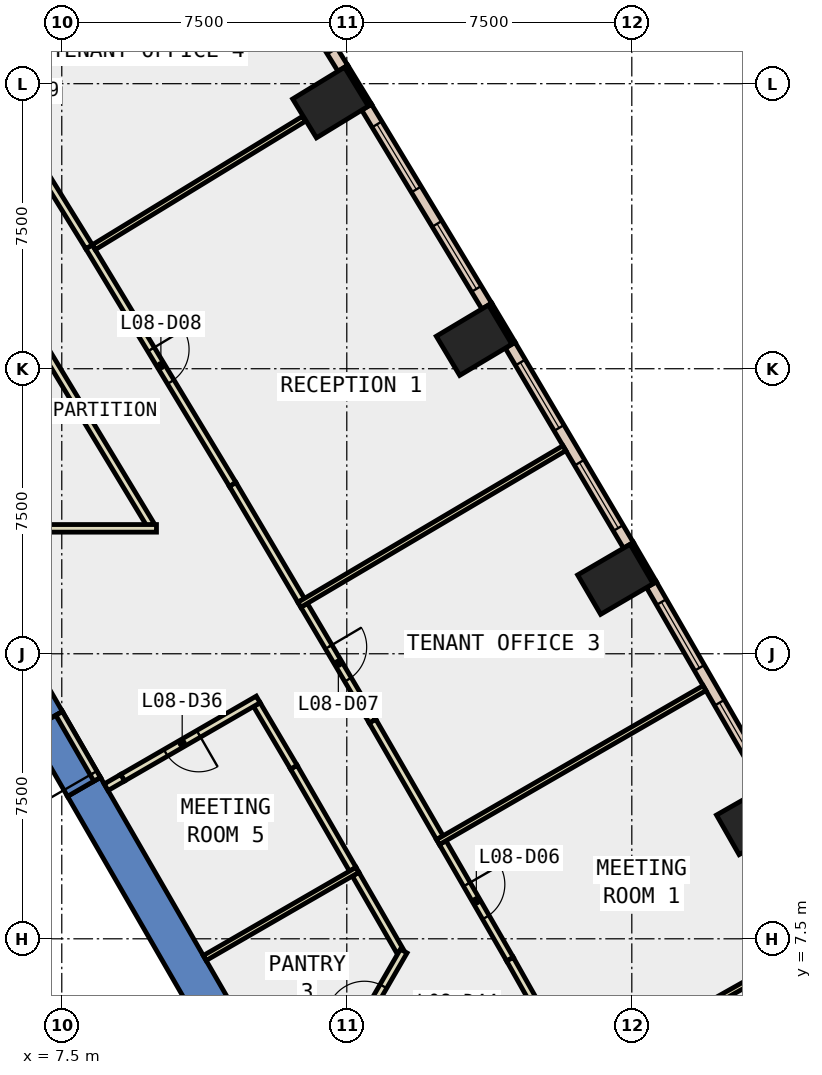
"""IFC4 building model, lengths in metres.
Left out: names, types, materials, properties, quantities, classifications, styles, units other than length and angle.
Written with IfcOpenShell. Run it as: python <this file> out.ifc"""

import sys

from ifc_helpers import new_model, si_unit, direction, frame, frame_2d, origin, origin_2d, place, context, subcontext, project, spatial, polyline, rectangle, outline, extrude, element, fill, save


model = new_model("IFC4")
c1 = context("Model", 3, precision=1e-05, world=origin(), true_north=direction((0.0, 1.0)))
c2 = subcontext(c1, "Body", "Model", "MODEL_VIEW")
j1 = project(units=[si_unit("LENGTHUNIT", "METRE"), si_unit("PLANEANGLEUNIT", "RADIAN")], contexts=[c1])
p1 = place(None, origin())
s1 = spatial("IfcSite", under=j1, at=p1, CompositionType="ELEMENT")
p2 = place(p1, origin())
s2 = spatial("IfcBuilding", under=s1, at=p2, CompositionType="ELEMENT")
p3 = place(p2, frame((0.0, 0.0, 43.4)))
s3 = spatial("IfcBuildingStorey", under=s2, at=p3, CompositionType="ELEMENT", Elevation=43.4)
for number, where, z_axis, x_axis in (
    (1, (25.721, 10.632, -0.4), (0.0, 0.0, 1.0), (-0.496, 0.869, 0.0)),
    (2, (22.068, 16.959, -0.4), (0.0, 0.0, 1.0), (-0.504, 0.864, 0.0)),
    (3, (18.35, 23.25, -0.4), (0.0, 0.0, 1.0), (-0.513, 0.858, 0.0)),
    (4, (14.571, 29.504, -0.4), (0.0, 0.0, 1.0), (-0.522, 0.853, 0.0)),
):
    element("IfcColumn", number, at=place(p3, frame(where, z_axis=z_axis, x_axis=x_axis)), inside=s3, PredefinedType="COLUMN", context=c2, shape_type="SweptSolid", body=[
        extrude(rectangle(XDim=1.2, YDim=1.6, at=origin_2d()), origin(), (0.0, 0.0, 1.0), 4.2),
    ])
p4 = place(p3, frame((0.0, 0.0, -0.4)))
e5 = element("IfcWall", 5, at=p4, inside=s3, PredefinedType="SHEAR", context=c2, shape_type="SweptSolid", body=[
    extrude(outline(polyline([(8.517, 11.748), (7.651, 11.248), (12.702, 2.5), (13.856, 2.5), (8.517, 11.748)])), origin(), (0.0, 0.0, 1.0), 4.2),
])
p5 = place(p3, frame((0.0, 0.0, -0.4)))
e6 = element("IfcWall", 6, at=p5, inside=s3, PredefinedType="SHEAR", context=c2, shape_type="SweptSolid", body=[
    extrude(outline(polyline([(6.651, 12.98), (7.517, 13.48), (6.928, 14.5), (6.351, 13.5), (6.651, 12.98)])), origin(), (0.0, 0.0, 1.0), 4.2),
])
p6 = place(p3, frame((0.0, 0.0, 3.6)))
e7 = element("IfcWall", 7, at=p6, inside=s3, PredefinedType="SHEAR", context=c2, shape_type="SweptSolid", body=[
    extrude(outline(polyline([(7.517, 13.48), (6.651, 12.98), (7.651, 11.248), (8.517, 11.748), (7.517, 13.48)])), origin(), (0.0, 0.0, 1.0), 0.2),
])
p7 = place(p3, frame((23.104, 16.87, 0.0), z_axis=(0.0, 0.0, 1.0), x_axis=(-0.504313844903, 0.863520437418, 0.0)))
e8 = element("IfcWall", 8, at=p7, inside=s3, PredefinedType="STANDARD", context=c2, shape_type="SweptSolid", body=[
    extrude(rectangle(XDim=1.2, YDim=0.1, at=frame_2d((0.6, 0.0))), origin(), (0.0, 0.0, 1.0), 3.8),
])
for number, where, z_axis, x_axis in (
    (9, (19.388, 23.171, 0.0), (0.0, 0.0, 1.0), (-0.513, 0.858, 0.0)),
    (10, (15.609, 29.435, 0.0), (0.0, 0.0, 1.0), (-0.522, 0.853, 0.0)),
):
    element("IfcWall", number, at=place(p3, frame(where, z_axis=z_axis, x_axis=x_axis)), inside=s3, PredefinedType="STANDARD", context=c2, shape_type="SweptSolid", body=[
        extrude(rectangle(XDim=1.2, YDim=0.1, at=frame_2d((0.6, 0.0))), origin(), (0.0, 0.0, 1.0), 3.8),
    ])
p8 = place(p3, frame((26.073, 11.522, 0.0), z_axis=(0.0, 0.0, 1.0), x_axis=(-0.499976985038, 0.866038691071, 0.0)))
e11 = element("IfcWall", 11, at=p8, inside=s3, PredefinedType="STANDARD", context=c2, shape_type="SweptSolid", body=[
    extrude(rectangle(XDim=6.116, YDim=0.3, at=frame_2d((3.058, 0.0))), origin(), (0.0, 0.0, 1.0), 3.8),
])
p9 = place(p8, frame((0.529, 0.0, 0.9)))
e12 = element("IfcOpeningElement", 12, at=p9, cuts=e11, PredefinedType="OPENING", context=c2, shape_type="SweptSolid", body=[
    extrude(rectangle(XDim=2.0, YDim=2.6, at=frame_2d((1.0, 1.3))), frame((0.0, 0.16, 0.0), z_axis=(0.0, -1.0, 0.0), x_axis=(1.0, 0.0, 0.0)), (0.0, 0.0, 1.0), 0.32),
])
p10 = place(p8, frame((3.587, 0.0, 0.9)))
e13 = element("IfcOpeningElement", 13, at=p10, cuts=e11, PredefinedType="OPENING", context=c2, shape_type="SweptSolid", body=[
    extrude(rectangle(XDim=2.0, YDim=2.6, at=frame_2d((1.0, 1.3))), frame((0.0, 0.16, 0.0), z_axis=(0.0, -1.0, 0.0), x_axis=(1.0, 0.0, 0.0)), (0.0, 0.0, 1.0), 0.32),
])
p11 = place(p3, frame((22.411, 17.853, 0.0), z_axis=(0.0, 0.0, 1.0), x_axis=(-0.508749483145, 0.860914608658, 0.0)))
e14 = element("IfcWall", 14, at=p11, inside=s3, PredefinedType="STANDARD", context=c2, shape_type="SweptSolid", body=[
    extrude(rectangle(XDim=6.117, YDim=0.3, at=frame_2d((3.058, 0.0))), origin(), (0.0, 0.0, 1.0), 3.8),
])
p12 = place(p11, frame((0.529, 0.0, 0.9)))
e15 = element("IfcOpeningElement", 15, at=p12, cuts=e14, PredefinedType="OPENING", context=c2, shape_type="SweptSolid", body=[
    extrude(rectangle(XDim=2.0, YDim=2.6, at=frame_2d((1.0, 1.3))), frame((0.0, 0.16, 0.0), z_axis=(0.0, -1.0, 0.0), x_axis=(1.0, 0.0, 0.0)), (0.0, 0.0, 1.0), 0.32),
])
p13 = place(p11, frame((3.588, 0.0, 0.9)))
e16 = element("IfcOpeningElement", 16, at=p13, cuts=e14, PredefinedType="OPENING", context=c2, shape_type="SweptSolid", body=[
    extrude(rectangle(XDim=2.0, YDim=2.6, at=frame_2d((1.0, 1.3))), frame((0.0, 0.16, 0.0), z_axis=(0.0, -1.0, 0.0), x_axis=(1.0, 0.0, 0.0)), (0.0, 0.0, 1.0), 0.32),
])
p14 = place(p3, frame((18.684, 24.148, 0.0), z_axis=(0.0, 0.0, 1.0), x_axis=(-0.517211293816, 0.855857743757, 0.0)))
e17 = element("IfcWall", 17, at=p14, inside=s3, PredefinedType="STANDARD", context=c2, shape_type="SweptSolid", body=[
    extrude(rectangle(XDim=6.116, YDim=0.3, at=frame_2d((3.058, 0.0))), origin(), (0.0, 0.0, 1.0), 3.8),
])
p15 = place(p14, frame((0.529, 0.0, 0.9)))
e18 = element("IfcOpeningElement", 18, at=p15, cuts=e17, PredefinedType="OPENING", context=c2, shape_type="SweptSolid", body=[
    extrude(rectangle(XDim=2.0, YDim=2.6, at=frame_2d((1.0, 1.3))), frame((0.0, 0.16, 0.0), z_axis=(0.0, -1.0, 0.0), x_axis=(1.0, 0.0, 0.0)), (0.0, 0.0, 1.0), 0.32),
])
p16 = place(p14, frame((3.587, 0.0, 0.9)))
e19 = element("IfcOpeningElement", 19, at=p16, cuts=e17, PredefinedType="OPENING", context=c2, shape_type="SweptSolid", body=[
    extrude(rectangle(XDim=2.0, YDim=2.6, at=frame_2d((1.0, 1.3))), frame((0.0, 0.16, 0.0), z_axis=(0.0, -1.0, 0.0), x_axis=(1.0, 0.0, 0.0)), (0.0, 0.0, 1.0), 0.32),
])
p17 = place(p3, frame((14.896, 30.404, 0.0), z_axis=(0.0, 0.0, 1.0), x_axis=(-0.525791118496, 0.850613719447, 0.0)))
e20 = element("IfcWall", 20, at=p17, inside=s3, PredefinedType="STANDARD", context=c2, shape_type="SweptSolid", body=[
    extrude(rectangle(XDim=6.117, YDim=0.3, at=frame_2d((3.058, 0.0))), origin(), (0.0, 0.0, 1.0), 3.8),
])
p18 = place(p17, frame((0.529, 0.0, 0.9)))
e21 = element("IfcOpeningElement", 21, at=p18, cuts=e20, PredefinedType="OPENING", context=c2, shape_type="SweptSolid", body=[
    extrude(rectangle(XDim=2.0, YDim=2.6, at=frame_2d((1.0, 1.3))), frame((0.0, 0.16, 0.0), z_axis=(0.0, -1.0, 0.0), x_axis=(1.0, 0.0, 0.0)), (0.0, 0.0, 1.0), 0.32),
])
p19 = place(p17, frame((3.588, 0.0, 0.9)))
e22 = element("IfcOpeningElement", 22, at=p19, cuts=e20, PredefinedType="OPENING", context=c2, shape_type="SweptSolid", body=[
    extrude(rectangle(XDim=2.0, YDim=2.6, at=frame_2d((1.0, 1.3))), frame((0.0, 0.16, 0.0), z_axis=(0.0, -1.0, 0.0), x_axis=(1.0, 0.0, 0.0)), (0.0, 0.0, 1.0), 0.32),
])
p20 = place(p3, frame((15.157, 9.33, 0.0), z_axis=(0.0, 0.0, 1.0), x_axis=(-0.500058580706, 0.865991579556, 0.0)))
e23 = element("IfcWall", 23, at=p20, inside=s3, PredefinedType="PARTITIONING", context=c2, shape_type="SweptSolid", body=[
    extrude(rectangle(XDim=3.102, YDim=0.2, at=frame_2d((1.551, 0.0))), origin(), (0.0, 0.0, 1.0), 3.8),
])
p21 = place(p3, frame((13.606, 12.016, 0.0), z_axis=(0.0, 0.0, 1.0), x_axis=(-0.508832553058, 0.860865513857, 0.0)))
e24 = element("IfcWall", 24, at=p21, inside=s3, PredefinedType="PARTITIONING", context=c2, shape_type="SweptSolid", body=[
    extrude(rectangle(XDim=1.912, YDim=0.2, at=frame_2d((0.956, 0.0))), origin(), (0.0, 0.0, 1.0), 3.8),
])
p22 = place(p3, frame((12.669, 13.799, 0.0), z_axis=(0.0, 0.0, 1.0), x_axis=(-0.865966559136, -0.500101908074, 0.0)))
e25 = element("IfcWall", 25, at=p22, inside=s3, PredefinedType="PARTITIONING", context=c2, shape_type="SweptSolid", body=[
    extrude(rectangle(XDim=4.121, YDim=0.2, at=frame_2d((2.061, 0.0))), origin(), (0.0, 0.0, 1.0), 3.8),
])
p23 = place(p22, frame((1.81, 0.0, 0.0)))
e26 = element("IfcOpeningElement", 26, at=p23, cuts=e25, PredefinedType="OPENING", context=c2, shape_type="SweptSolid", body=[
    extrude(rectangle(XDim=1.0, YDim=2.1, at=frame_2d((0.5, 1.05))), frame((0.0, 0.11, 0.0), z_axis=(0.0, -1.0, 0.0), x_axis=(1.0, 0.0, 0.0)), (0.0, 0.0, 1.0), 0.22),
])
p24 = place(p3, frame((16.399, 7.178, 0.0), z_axis=(0.0, 0.0, 1.0), x_axis=(-0.499873332494, 0.866098522953, 0.0)))
e27 = element("IfcWall", 27, at=p24, inside=s3, PredefinedType="PARTITIONING", context=c2, shape_type="SweptSolid", body=[
    extrude(rectangle(XDim=2.334, YDim=0.2, at=frame_2d((1.167, 0.0))), origin(), (0.0, 0.0, 1.0), 3.8),
])
p25 = place(p3, frame((9.84, 18.386, 0.0), z_axis=(0.0, 0.0, 1.0), x_axis=(-0.51736780002, 0.85576314451, 0.0)))
e28 = element("IfcWall", 28, at=p25, inside=s3, PredefinedType="PARTITIONING", context=c2, shape_type="SweptSolid", body=[
    extrude(rectangle(XDim=7.018, YDim=0.2, at=frame_2d((3.509, 0.0))), origin(), (0.0, 0.0, 1.0), 3.8),
])
p26 = place(p3, frame((17.524, 10.031, 0.0), z_axis=(0.0, 0.0, 1.0), x_axis=(0.499861717316, -0.86610522661, 0.0)))
e29 = element("IfcWall", 29, at=p26, inside=s3, PredefinedType="PARTITIONING", context=c2, shape_type="SweptSolid", body=[
    extrude(rectangle(XDim=3.541, YDim=0.2, at=frame_2d((1.771, 0.0))), origin(), (0.0, 0.0, 1.0), 3.8),
])
p27 = place(p26, frame((1.27, 0.0, 0.0)))
e30 = element("IfcOpeningElement", 30, at=p27, cuts=e29, PredefinedType="OPENING", context=c2, shape_type="SweptSolid", body=[
    extrude(rectangle(XDim=1.0, YDim=2.1, at=frame_2d((0.5, 1.05))), frame((0.0, 0.11, 0.0), z_axis=(0.0, -1.0, 0.0), x_axis=(1.0, 0.0, 0.0)), (0.0, 0.0, 1.0), 0.22),
])
p28 = place(p3, frame((19.294, 6.964, 0.0), z_axis=(0.0, 0.0, 1.0), x_axis=(0.491148159943, -0.871076050058, 0.0)))
e31 = element("IfcWall", 31, at=p28, inside=s3, PredefinedType="PARTITIONING", context=c2, shape_type="SweptSolid", body=[
    extrude(rectangle(XDim=3.541, YDim=0.2, at=frame_2d((1.771, 0.0))), origin(), (0.0, 0.0, 1.0), 3.8),
])
p29 = place(p3, frame((13.877, 16.275, 0.0), z_axis=(0.0, 0.0, 1.0), x_axis=(0.508613166028, -0.860995149431, 0.0)))
e32 = element("IfcWall", 32, at=p29, inside=s3, PredefinedType="PARTITIONING", context=c2, shape_type="SweptSolid", body=[
    extrude(rectangle(XDim=3.541, YDim=0.2, at=frame_2d((1.771, 0.0))), origin(), (0.0, 0.0, 1.0), 3.8),
])
p30 = place(p29, frame((1.271, 0.0, 0.0)))
e33 = element("IfcOpeningElement", 33, at=p30, cuts=e32, PredefinedType="OPENING", context=c2, shape_type="SweptSolid", body=[
    extrude(rectangle(XDim=1.0, YDim=2.1, at=frame_2d((0.5, 1.05))), frame((0.0, 0.11, 0.0), z_axis=(0.0, -1.0, 0.0), x_axis=(1.0, 0.0, 0.0)), (0.0, 0.0, 1.0), 0.22),
])
p31 = place(p3, frame((15.678, 13.226, 0.0), z_axis=(0.0, 0.0, 1.0), x_axis=(0.499951278228, -0.866053531485, 0.0)))
e34 = element("IfcWall", 34, at=p31, inside=s3, PredefinedType="PARTITIONING", context=c2, shape_type="SweptSolid", body=[
    extrude(rectangle(XDim=3.54, YDim=0.2, at=frame_2d((1.77, 0.0))), origin(), (0.0, 0.0, 1.0), 3.8),
])
p32 = place(p3, frame((8.218, 25.708, 0.0), z_axis=(0.0, 0.0, 1.0), x_axis=(0.517278800461, -0.855816944559, 0.0)))
e35 = element("IfcWall", 35, at=p32, inside=s3, PredefinedType="PARTITIONING", context=c2, shape_type="SweptSolid", body=[
    extrude(rectangle(XDim=7.308, YDim=0.2, at=frame_2d((3.654, 0.0))), origin(), (0.0, 0.0, 1.0), 3.8),
])
p33 = place(p32, frame((3.154, 0.0, 0.0)))
e36 = element("IfcOpeningElement", 36, at=p33, cuts=e35, PredefinedType="OPENING", context=c2, shape_type="SweptSolid", body=[
    extrude(rectangle(XDim=1.0, YDim=2.1, at=frame_2d((0.5, 1.05))), frame((0.0, 0.11, 0.0), z_axis=(0.0, -1.0, 0.0), x_axis=(1.0, 0.0, 0.0)), (0.0, 0.0, 1.0), 0.22),
])
p34 = place(p3, frame((11.998, 19.454, 0.0), z_axis=(0.0, 0.0, 1.0), x_axis=(0.508666621784, -0.860963569428, 0.0)))
e37 = element("IfcWall", 37, at=p34, inside=s3, PredefinedType="PARTITIONING", context=c2, shape_type="SweptSolid", body=[
    extrude(rectangle(XDim=3.542, YDim=0.2, at=frame_2d((1.771, 0.0))), origin(), (0.0, 0.0, 1.0), 3.8),
])
p35 = place(p3, frame((4.414, 31.86, 0.0), z_axis=(0.0, 0.0, 1.0), x_axis=(0.525906013367, -0.850542688584, 0.0)))
e38 = element("IfcWall", 38, at=p35, inside=s3, PredefinedType="PARTITIONING", context=c2, shape_type="SweptSolid", body=[
    extrude(rectangle(XDim=7.233, YDim=0.2, at=frame_2d((3.617, 0.0))), origin(), (0.0, 0.0, 1.0), 3.8),
])
p36 = place(p35, frame((3.191, 0.0, 0.0)))
e39 = element("IfcOpeningElement", 39, at=p36, cuts=e38, PredefinedType="OPENING", context=c2, shape_type="SweptSolid", body=[
    extrude(rectangle(XDim=1.0, YDim=2.1, at=frame_2d((0.5, 1.05))), frame((0.0, 0.11, 0.0), z_axis=(0.0, -1.0, 0.0), x_axis=(1.0, 0.0, 0.0)), (0.0, 0.0, 1.0), 0.22),
])
p37 = place(p3, frame((15.281, 9.315, 0.0), z_axis=(0.0, 0.0, 1.0), x_axis=(-0.86601742213, -0.500013824377, 0.0)))
e40 = element("IfcWall", 40, at=p37, inside=s3, PredefinedType="PARTITIONING", context=c2, shape_type="SweptSolid", body=[
    extrude(rectangle(XDim=4.642, YDim=0.15, at=frame_2d((2.321, 0.0))), origin(), (0.0, 0.0, 1.0), 3.8),
])
p38 = place(p3, frame((13.827, 2.55, 0.0), z_axis=(0.0, 0.0, 1.0), x_axis=(0.50002563942, 0.866010600352, 0.0)))
e41 = element("IfcWall", 41, at=p38, inside=s3, PredefinedType="PARTITIONING", context=c2, shape_type="SweptSolid", body=[
    extrude(rectangle(XDim=5.344, YDim=0.2, at=frame_2d((2.672, 0.0))), origin(), (0.0, 0.0, 1.0), 3.8),
])
p39 = place(p38, frame((2.172, 0.0, 0.0)))
e42 = element("IfcOpeningElement", 42, at=p39, cuts=e41, PredefinedType="OPENING", context=c2, shape_type="SweptSolid", body=[
    extrude(rectangle(XDim=1.0, YDim=2.1, at=frame_2d((0.5, 1.05))), frame((0.0, 0.11, 0.0), z_axis=(0.0, -1.0, 0.0), x_axis=(1.0, 0.0, 0.0)), (0.0, 0.0, 1.0), 0.22),
])
p40 = place(p38, frame((3.272, 0.0, 0.0)))
e43 = element("IfcOpeningElement", 43, at=p40, cuts=e41, PredefinedType="OPENING", context=c2, shape_type="SweptSolid", body=[
    extrude(rectangle(XDim=1.0, YDim=2.1, at=frame_2d((0.5, 1.05))), frame((0.0, 0.11, 0.0), z_axis=(0.0, -1.0, 0.0), x_axis=(1.0, 0.0, 0.0)), (0.0, 0.0, 1.0), 0.22),
])
p41 = place(p3, frame((20.983, 3.766, 0.0), z_axis=(0.0, 0.0, 1.0), x_axis=(0.871022781656, 0.491242622169, 0.0)))
e44 = element("IfcWall", 44, at=p41, inside=s3, PredefinedType="PARTITIONING", context=c2, shape_type="SweptSolid", body=[
    extrude(rectangle(XDim=8.1, YDim=0.15, at=frame_2d((4.05, 0.0))), origin(), (0.0, 0.0, 1.0), 3.8),
])
p42 = place(p3, frame((17.399, 10.045, 0.0), z_axis=(0.0, 0.0, 1.0), x_axis=(0.865980803489, 0.500077242023, 0.0)))
e45 = element("IfcWall", 45, at=p42, inside=s3, PredefinedType="PARTITIONING", context=c2, shape_type="SweptSolid", body=[
    extrude(rectangle(XDim=8.101, YDim=0.15, at=frame_2d((4.05, 0.0))), origin(), (0.0, 0.0, 1.0), 3.8),
])
p43 = place(p3, frame((13.752, 16.289, 0.0), z_axis=(0.0, 0.0, 1.0), x_axis=(0.86093852802, 0.508709004216, 0.0)))
e46 = element("IfcWall", 46, at=p43, inside=s3, PredefinedType="PARTITIONING", context=c2, shape_type="SweptSolid", body=[
    extrude(rectangle(XDim=8.101, YDim=0.15, at=frame_2d((4.05, 0.0))), origin(), (0.0, 0.0, 1.0), 3.8),
])
p44 = place(p3, frame((8.342, 25.696, 0.0), z_axis=(0.0, 0.0, 1.0), x_axis=(0.853252966465, 0.521497243731, 0.0)))
e47 = element("IfcWall", 47, at=p44, inside=s3, PredefinedType="PARTITIONING", context=c2, shape_type="SweptSolid", body=[
    extrude(rectangle(XDim=6.481, YDim=0.15, at=frame_2d((3.241, 0.0))), origin(), (0.0, 0.0, 1.0), 3.8),
])
p45 = place(p3, frame((8.43, 11.698, 0.0), z_axis=(0.0, 0.0, 1.0), x_axis=(-0.50002537861, 0.866010750942, 0.0)))
e48 = element("IfcWall", 48, at=p45, inside=s3, PredefinedType="PARTITIONING", context=c2, shape_type="SweptSolid", body=[
    extrude(rectangle(XDim=2.0, YDim=0.2, at=frame_2d((1.0, 0.0))), origin(), (0.0, 0.0, 1.0), 2.4),
])
p46 = place(p45, frame((0.19, 0.0, 0.0)))
e49 = element("IfcOpeningElement", 49, at=p46, cuts=e48, PredefinedType="OPENING", context=c2, shape_type="SweptSolid", body=[
    extrude(rectangle(XDim=1.8, YDim=2.1, at=frame_2d((0.9, 1.05))), frame((0.0, 0.11, 0.0), z_axis=(0.0, -1.0, 0.0), x_axis=(1.0, 0.0, 0.0)), (0.0, 0.0, 1.0), 0.22),
])
p47 = place(p3, frame((0.4, 18.3, 0.0), z_axis=(0.0, 0.0, 1.0), x_axis=(1.0, 0.0, 0.0)))
e50 = element("IfcWall", 50, at=p47, inside=s3, PredefinedType="PARTITIONING", context=c2, shape_type="SweptSolid", body=[
    extrude(rectangle(XDim=9.592, YDim=0.2, at=frame_2d((4.796, 0.0))), origin(), (0.0, 0.0, 1.0), 3.8),
])
p48 = place(p3, frame((9.1, 11.738, 0.0), z_axis=(0.0, 0.0, 1.0), x_axis=(-0.866071776036, -0.499919672301, 0.0)))
e51 = element("IfcWall", 51, at=p48, inside=s3, PredefinedType="PARTITIONING", context=c2, shape_type="SweptSolid", body=[
    extrude(rectangle(XDim=0.5, YDim=0.2, at=frame_2d((0.25, 0.0))), origin(), (0.0, 0.0, 1.0), 2.4),
])
p49 = place(p3, frame((8.48, 3.412, 0.0), z_axis=(0.0, 0.0, 1.0), x_axis=(-0.499978703459, 0.866037698999, 0.0)))
e52 = element("IfcWall", 52, at=p49, inside=s3, PredefinedType="STANDARD", context=c2, shape_type="SweptSolid", body=[
    extrude(rectangle(XDim=6.9, YDim=0.2, at=frame_2d((3.45, 0.0))), origin(), (0.0, 0.0, 1.0), 3.8),
])
p50 = place(p9, origin())
e53 = element("IfcWindow", 53, at=p50, inside=s3, PartitioningType="SINGLE_PANEL", PredefinedType="WINDOW", context=c2, shape_type="SweptSolid", body=[
    extrude(rectangle(XDim=2.0, YDim=2.6, at=frame_2d((1.0, 1.3))), frame((0.0, 0.03, 0.0), z_axis=(0.0, -1.0, 0.0), x_axis=(1.0, 0.0, 0.0)), (0.0, 0.0, 1.0), 0.06),
])
fill(e12, e53)
p51 = place(p10, origin())
e54 = element("IfcWindow", 54, at=p51, inside=s3, PartitioningType="SINGLE_PANEL", PredefinedType="WINDOW", context=c2, shape_type="SweptSolid", body=[
    extrude(rectangle(XDim=2.0, YDim=2.6, at=frame_2d((1.0, 1.3))), frame((0.0, 0.03, 0.0), z_axis=(0.0, -1.0, 0.0), x_axis=(1.0, 0.0, 0.0)), (0.0, 0.0, 1.0), 0.06),
])
fill(e13, e54)
p52 = place(p12, origin())
e55 = element("IfcWindow", 55, at=p52, inside=s3, PartitioningType="SINGLE_PANEL", PredefinedType="WINDOW", context=c2, shape_type="SweptSolid", body=[
    extrude(rectangle(XDim=2.0, YDim=2.6, at=frame_2d((1.0, 1.3))), frame((0.0, 0.03, 0.0), z_axis=(0.0, -1.0, 0.0), x_axis=(1.0, 0.0, 0.0)), (0.0, 0.0, 1.0), 0.06),
])
fill(e15, e55)
p53 = place(p13, origin())
e56 = element("IfcWindow", 56, at=p53, inside=s3, PartitioningType="SINGLE_PANEL", PredefinedType="WINDOW", context=c2, shape_type="SweptSolid", body=[
    extrude(rectangle(XDim=2.0, YDim=2.6, at=frame_2d((1.0, 1.3))), frame((0.0, 0.03, 0.0), z_axis=(0.0, -1.0, 0.0), x_axis=(1.0, 0.0, 0.0)), (0.0, 0.0, 1.0), 0.06),
])
fill(e16, e56)
p54 = place(p15, origin())
e57 = element("IfcWindow", 57, at=p54, inside=s3, PartitioningType="SINGLE_PANEL", PredefinedType="WINDOW", context=c2, shape_type="SweptSolid", body=[
    extrude(rectangle(XDim=2.0, YDim=2.6, at=frame_2d((1.0, 1.3))), frame((0.0, 0.03, 0.0), z_axis=(0.0, -1.0, 0.0), x_axis=(1.0, 0.0, 0.0)), (0.0, 0.0, 1.0), 0.06),
])
fill(e18, e57)
p55 = place(p16, origin())
e58 = element("IfcWindow", 58, at=p55, inside=s3, PartitioningType="SINGLE_PANEL", PredefinedType="WINDOW", context=c2, shape_type="SweptSolid", body=[
    extrude(rectangle(XDim=2.0, YDim=2.6, at=frame_2d((1.0, 1.3))), frame((0.0, 0.03, 0.0), z_axis=(0.0, -1.0, 0.0), x_axis=(1.0, 0.0, 0.0)), (0.0, 0.0, 1.0), 0.06),
])
fill(e19, e58)
p56 = place(p27, origin())
e59 = element("IfcDoor", 59, at=p56, inside=s3, OperationType="SINGLE_SWING_LEFT", PredefinedType="DOOR", context=c2, shape_type="SweptSolid", body=[
    extrude(rectangle(XDim=1.0, YDim=2.1, at=frame_2d((0.5, 1.05))), frame((0.0, 0.025, 0.0), z_axis=(0.0, -1.0, 0.0), x_axis=(1.0, 0.0, 0.0)), (0.0, 0.0, 1.0), 0.05),
])
fill(e30, e59)
p57 = place(p30, origin())
e60 = element("IfcDoor", 60, at=p57, inside=s3, OperationType="SINGLE_SWING_LEFT", PredefinedType="DOOR", context=c2, shape_type="SweptSolid", body=[
    extrude(rectangle(XDim=1.0, YDim=2.1, at=frame_2d((0.5, 1.05))), frame((0.0, 0.025, 0.0), z_axis=(0.0, -1.0, 0.0), x_axis=(1.0, 0.0, 0.0)), (0.0, 0.0, 1.0), 0.05),
])
fill(e33, e60)
p58 = place(p33, origin())
e61 = element("IfcDoor", 61, at=p58, inside=s3, OperationType="SINGLE_SWING_LEFT", PredefinedType="DOOR", context=c2, shape_type="SweptSolid", body=[
    extrude(rectangle(XDim=1.0, YDim=2.1, at=frame_2d((0.5, 1.05))), frame((0.0, 0.025, 0.0), z_axis=(0.0, -1.0, 0.0), x_axis=(1.0, 0.0, 0.0)), (0.0, 0.0, 1.0), 0.05),
])
fill(e36, e61)
p59 = place(p23, origin())
e62 = element("IfcDoor", 62, at=p59, inside=s3, OperationType="SINGLE_SWING_LEFT", PredefinedType="DOOR", context=c2, shape_type="SweptSolid", body=[
    extrude(rectangle(XDim=1.0, YDim=2.1, at=frame_2d((0.5, 1.05))), frame((0.0, 0.025, 0.0), z_axis=(0.0, -1.0, 0.0), x_axis=(1.0, 0.0, 0.0)), (0.0, 0.0, 1.0), 0.05),
])
fill(e26, e62)
p60 = place(p40, origin())
e63 = element("IfcDoor", 63, at=p60, inside=s3, OperationType="SINGLE_SWING_RIGHT", PredefinedType="DOOR", context=c2, shape_type="SweptSolid", body=[
    extrude(rectangle(XDim=1.0, YDim=2.1, at=frame_2d((0.5, 1.05))), frame((0.0, 0.025, 0.0), z_axis=(0.0, -1.0, 0.0), x_axis=(1.0, 0.0, 0.0)), (0.0, 0.0, 1.0), 0.05),
])
fill(e43, e63)
p61 = place(p46, origin())
e64 = element("IfcDoor", 64, at=p61, inside=s3, OperationType="DOUBLE_DOOR_SINGLE_SWING", PredefinedType="DOOR", context=c2, shape_type="SweptSolid", body=[
    extrude(rectangle(XDim=1.8, YDim=2.1, at=frame_2d((0.9, 1.05))), frame((0.0, 0.025, 0.0), z_axis=(0.0, -1.0, 0.0), x_axis=(1.0, 0.0, 0.0)), (0.0, 0.0, 1.0), 0.05),
])
fill(e49, e64)
save(model, sys.argv[1])
